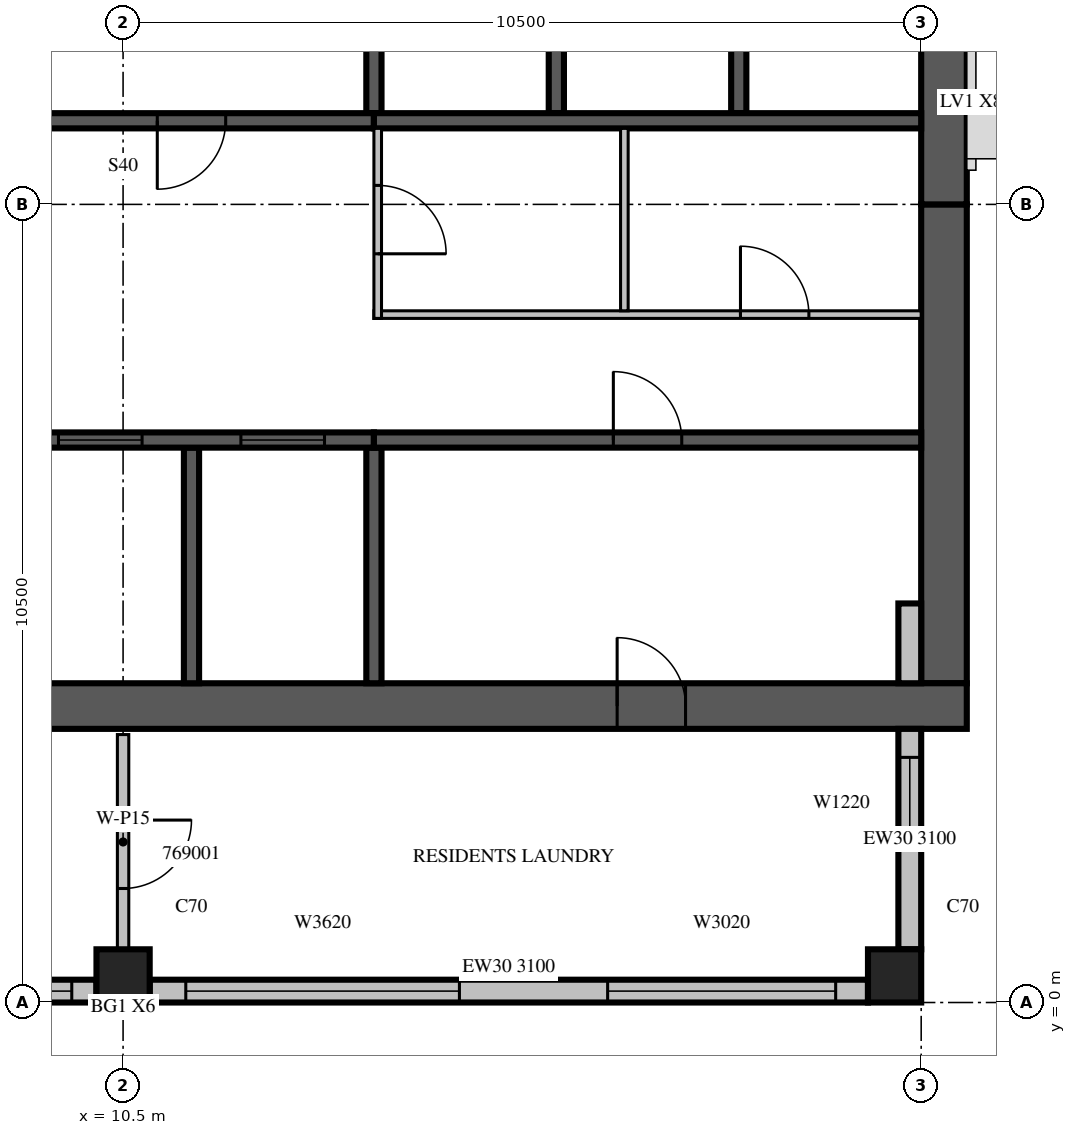
"""IFC4 building model, lengths in metres.
Left out: names, types, materials, properties, quantities, classifications, styles, units other than length and angle.
Written with IfcOpenShell. Run it as: python <this file> out.ifc"""

import sys

from ifc_helpers import new_model, si_unit, direction, frame, frame_2d, origin, origin_2d, place, context, subcontext, project, spatial, rectangle, extrude, source, transform, mapped, element, fill, save


model = new_model("IFC4")
c1 = context("Model", 3, precision=1e-05, world=origin(), true_north=direction((0.0, 1.0)))
c2 = subcontext(c1, "Body", "Model", "MODEL_VIEW")
j1 = project(units=[si_unit("LENGTHUNIT", "METRE"), si_unit("PLANEANGLEUNIT", "RADIAN")], contexts=[c1])
p1 = place(None, origin())
s1 = spatial("IfcSite", under=j1, at=p1, CompositionType="ELEMENT")
p2 = place(p1, origin())
s2 = spatial("IfcBuilding", under=s1, at=p2, CompositionType="ELEMENT")
p3 = place(p2, frame((0.0, 0.0, 302.0)))
s3 = spatial("IfcBuildingStorey", under=s2, at=p3, CompositionType="ELEMENT", Elevation=302.0)
m1 = source(origin(), c2, "Body", "SweptSolid", [
    extrude(rectangle(XDim=0.7, YDim=0.7, at=origin_2d()), origin(), (0.0, 0.0, 1.0), 3.5),
])
for number, where, z_axis, x_axis in (
    (1, (10.5, 0.35, 0.0), (0.0, 0.0, 1.0), (1.0, 0.0, 0.0)),
    (2, (20.65, 0.35, 0.0), (0.0, 0.0, 1.0), (1.0, 0.0, 0.0)),
):
    element("IfcColumn", number, at=place(p3, frame(where, z_axis=z_axis, x_axis=x_axis)), inside=s3, PredefinedType="COLUMN", context=c2, shape_type="MappedRepresentation", body=[
        mapped(m1, transform((0.0, 0.0, 0.0), scale=1.0)),
    ])
m2 = source(origin(), c2, "Body", "SweptSolid", [
    extrude(rectangle(XDim=6.3, YDim=0.6, at=frame_2d((3.15, 0.0))), origin(), (0.0, 0.0, 1.0), 3.5),
])
p4 = place(p3, frame((21.3, 4.2, 0.0), z_axis=(0.0, 0.0, 1.0), x_axis=(0.0, 1.0, 0.0)))
e3 = element("IfcWall", 3, at=p4, inside=s3, PredefinedType="SHEAR", context=c2, shape_type="MappedRepresentation", body=[
    mapped(m2, transform((0.0, 0.0, 0.0), scale=1.0)),
])
m3 = source(origin(), c2, "Body", "SweptSolid", [
    extrude(rectangle(XDim=17.4, YDim=0.6, at=frame_2d((8.7, 0.0))), origin(), (0.0, 0.0, 1.0), 3.5),
])
p5 = place(p3, frame((4.2, 3.9, 0.0), z_axis=(0.0, 0.0, 1.0), x_axis=(1.0, 0.0, 0.0)))
e4 = element("IfcWall", 4, at=p5, inside=s3, PredefinedType="SHEAR", context=c2, shape_type="MappedRepresentation", body=[
    mapped(m3, transform((0.0, 0.0, 0.0), scale=1.0)),
])
m4 = source(origin(), c2, "Body", "SweptSolid", [
    extrude(rectangle(XDim=0.9, YDim=2.1, at=frame_2d((0.45, 1.05))), frame((0.0, 0.31, 0.0), z_axis=(0.0, -1.0, 0.0), x_axis=(1.0, 0.0, 0.0)), (0.0, 0.0, 1.0), 0.62),
])
p6 = place(p5, frame((12.8, 0.0, 0.0)))
e5 = element("IfcOpeningElement", 5, at=p6, cuts=e4, PredefinedType="OPENING", context=c2, shape_type="MappedRepresentation", body=[
    mapped(m4, transform((0.0, 0.0, 0.0), scale=1.0)),
])
m5 = source(origin(), c2, "Body", "SweptSolid", [
    extrude(rectangle(XDim=10.5, YDim=0.6, at=frame_2d((5.25, 0.0))), origin(), (0.0, 0.0, 1.0), 3.5),
])
p7 = place(p3, frame((21.3, 10.5, 0.0), z_axis=(0.0, 0.0, 1.0), x_axis=(0.0, 1.0, 0.0)))
e6 = element("IfcWall", 6, at=p7, inside=s3, PredefinedType="SHEAR", context=c2, shape_type="MappedRepresentation", body=[
    mapped(m5, transform((0.0, 0.0, 0.0), scale=1.0)),
])
m6 = source(origin(), c2, "Body", "SweptSolid", [
    extrude(rectangle(XDim=1.2, YDim=2.4, at=frame_2d((0.6, 1.2))), frame((0.0, 0.31, 0.0), z_axis=(0.0, -1.0, 0.0), x_axis=(1.0, 0.0, 0.0)), (0.0, 0.0, 1.0), 0.62),
])
p8 = place(p7, frame((5.7, 0.0, 0.6)))
e7 = element("IfcOpeningElement", 7, at=p8, cuts=e6, PredefinedType="OPENING", context=c2, shape_type="MappedRepresentation", body=[
    mapped(m6, transform((0.0, 0.0, 0.0), scale=1.0)),
])
m7 = source(origin(), c2, "Body", "SweptSolid", [
    extrude(rectangle(XDim=5.95, YDim=0.3, at=frame_2d((2.975, 0.0))), origin(), (0.0, 0.0, 1.0), 3.1),
])
p9 = place(p3, frame((4.2, 0.15, 0.0), z_axis=(0.0, 0.0, 1.0), x_axis=(1.0, 0.0, 0.0)))
e8 = element("IfcWall", 8, at=p9, inside=s3, PredefinedType="STANDARD", context=c2, shape_type="MappedRepresentation", body=[
    mapped(m7, transform((0.0, 0.0, 0.0), scale=1.0)),
])
m8 = source(origin(), c2, "Body", "SweptSolid", [
    extrude(rectangle(XDim=1.8, YDim=2.0, at=frame_2d((0.9, 1.0))), frame((0.0, 0.16, 0.0), z_axis=(0.0, -1.0, 0.0), x_axis=(1.0, 0.0, 0.0)), (0.0, 0.0, 1.0), 0.32),
])
p10 = place(p9, frame((0.675, 0.0, 0.6)))
e9 = element("IfcOpeningElement", 9, at=p10, cuts=e8, PredefinedType="OPENING", context=c2, shape_type="MappedRepresentation", body=[
    mapped(m8, transform((0.0, 0.0, 0.0), scale=1.0)),
])
p11 = place(p9, frame((3.825, 0.0, 0.6)))
e10 = element("IfcOpeningElement", 10, at=p11, cuts=e8, PredefinedType="OPENING", context=c2, shape_type="MappedRepresentation", body=[
    mapped(m8, transform((0.0, 0.0, 0.0), scale=1.0)),
])
m9 = source(origin(), c2, "Body", "SweptSolid", [
    extrude(rectangle(XDim=9.45, YDim=0.3, at=frame_2d((4.725, 0.0))), origin(), (0.0, 0.0, 1.0), 3.1),
])
p12 = place(p3, frame((10.85, 0.15, 0.0), z_axis=(0.0, 0.0, 1.0), x_axis=(1.0, 0.0, 0.0)))
e11 = element("IfcWall", 11, at=p12, inside=s3, PredefinedType="STANDARD", context=c2, shape_type="MappedRepresentation", body=[
    mapped(m9, transform((0.0, 0.0, 0.0), scale=1.0)),
])
m10 = source(origin(), c2, "Body", "SweptSolid", [
    extrude(rectangle(XDim=3.6, YDim=2.0, at=frame_2d((1.8, 1.0))), frame((0.0, 0.16, 0.0), z_axis=(0.0, -1.0, 0.0), x_axis=(1.0, 0.0, 0.0)), (0.0, 0.0, 1.0), 0.32),
])
p13 = place(p12, frame((0.475, 0.0, 0.6)))
e12 = element("IfcOpeningElement", 12, at=p13, cuts=e11, PredefinedType="OPENING", context=c2, shape_type="MappedRepresentation", body=[
    mapped(m10, transform((0.0, 0.0, 0.0), scale=1.0)),
])
m11 = source(origin(), c2, "Body", "SweptSolid", [
    extrude(rectangle(XDim=3.0, YDim=2.0, at=frame_2d((1.5, 1.0))), frame((0.0, 0.16, 0.0), z_axis=(0.0, -1.0, 0.0), x_axis=(1.0, 0.0, 0.0)), (0.0, 0.0, 1.0), 0.32),
])
p14 = place(p12, frame((6.025, 0.0, 0.6)))
e13 = element("IfcOpeningElement", 13, at=p14, cuts=e11, PredefinedType="OPENING", context=c2, shape_type="MappedRepresentation", body=[
    mapped(m11, transform((0.0, 0.0, 0.0), scale=1.0)),
])
m12 = source(origin(), c2, "Body", "SweptSolid", [
    extrude(rectangle(XDim=2.9, YDim=0.3, at=frame_2d((1.45, 0.0))), origin(), (0.0, 0.0, 1.0), 3.1),
])
p15 = place(p3, frame((20.85, 0.7, 0.0), z_axis=(0.0, 0.0, 1.0), x_axis=(0.0, 1.0, 0.0)))
e14 = element("IfcWall", 14, at=p15, inside=s3, PredefinedType="STANDARD", context=c2, shape_type="MappedRepresentation", body=[
    mapped(m12, transform((0.0, 0.0, 0.0), scale=1.0)),
])
m13 = source(origin(), c2, "Body", "SweptSolid", [
    extrude(rectangle(XDim=1.2, YDim=2.0, at=frame_2d((0.6, 1.0))), frame((0.0, 0.16, 0.0), z_axis=(0.0, -1.0, 0.0), x_axis=(1.0, 0.0, 0.0)), (0.0, 0.0, 1.0), 0.32),
])
p16 = place(p15, frame((1.325, 0.0, 0.6)))
e15 = element("IfcOpeningElement", 15, at=p16, cuts=e14, PredefinedType="OPENING", context=c2, shape_type="MappedRepresentation", body=[
    mapped(m13, transform((0.0, 0.0, 0.0), scale=1.0)),
])
m14 = source(origin(), c2, "Body", "SweptSolid", [
    extrude(rectangle(XDim=1.05, YDim=0.3, at=frame_2d((0.525, 0.0))), origin(), (0.0, 0.0, 1.0), 3.1),
])
p17 = place(p3, frame((20.85, 4.2, 0.0), z_axis=(0.0, 0.0, 1.0), x_axis=(0.0, 1.0, 0.0)))
e16 = element("IfcWall", 16, at=p17, inside=s3, PredefinedType="STANDARD", context=c2, shape_type="MappedRepresentation", body=[
    mapped(m14, transform((0.0, 0.0, 0.0), scale=1.0)),
])
m15 = source(origin(), c2, "Body", "SweptSolid", [
    extrude(rectangle(XDim=3.1, YDim=0.2, at=frame_2d((1.55, 0.0))), origin(), (0.0, 0.0, 1.0), 3.5),
])
p18 = place(p3, frame((11.4, 4.2, 0.0), z_axis=(0.0, 0.0, 1.0), x_axis=(0.0, 1.0, 0.0)))
e17 = element("IfcWall", 17, at=p18, inside=s3, PredefinedType="SOLIDWALL", context=c2, shape_type="MappedRepresentation", body=[
    mapped(m15, transform((0.0, 0.0, 0.0), scale=1.0)),
])
m16 = source(origin(), c2, "Body", "SweptSolid", [
    extrude(rectangle(XDim=3.1, YDim=0.2, at=frame_2d((1.55, 0.0))), origin(), (0.0, 0.0, 1.0), 3.1),
])
p19 = place(p3, frame((13.8, 4.2, 0.0), z_axis=(0.0, 0.0, 1.0), x_axis=(0.0, 1.0, 0.0)))
e18 = element("IfcWall", 18, at=p19, inside=s3, PredefinedType="SOLIDWALL", context=c2, shape_type="MappedRepresentation", body=[
    mapped(m16, transform((0.0, 0.0, 0.0), scale=1.0)),
])
m17 = source(origin(), c2, "Body", "SweptSolid", [
    extrude(rectangle(XDim=3.0, YDim=0.2, at=frame_2d((1.5, 0.0))), origin(), (0.0, 0.0, 1.0), 3.1),
])
p20 = place(p3, frame((13.8, 11.7, 0.0), z_axis=(0.0, 0.0, 1.0), x_axis=(0.0, 1.0, 0.0)))
e19 = element("IfcWall", 19, at=p20, inside=s3, PredefinedType="SOLIDWALL", context=c2, shape_type="MappedRepresentation", body=[
    mapped(m17, transform((0.0, 0.0, 0.0), scale=1.0)),
])
m18 = source(origin(), c2, "Body", "SweptSolid", [
    extrude(rectangle(XDim=3.0, YDim=0.2, at=frame_2d((1.5, 0.0))), origin(), (0.0, 0.0, 1.0), 3.5),
])
for number, where, z_axis, x_axis in (
    (20, (16.2, 11.7, 0.0), (0.0, 0.0, 1.0), (0.0, 1.0, 0.0)),
    (21, (18.6, 11.7, 0.0), (0.0, 0.0, 1.0), (0.0, 1.0, 0.0)),
):
    element("IfcWall", number, at=place(p3, frame(where, z_axis=z_axis, x_axis=x_axis)), inside=s3, PredefinedType="SOLIDWALL", context=c2, shape_type="MappedRepresentation", body=[
        mapped(m18, transform((0.0, 0.0, 0.0), scale=1.0)),
    ])
m19 = source(origin(), c2, "Body", "SweptSolid", [
    extrude(rectangle(XDim=9.6, YDim=0.2, at=frame_2d((4.8, 0.0))), origin(), (0.0, 0.0, 1.0), 3.5),
])
p21 = place(p3, frame((4.2, 7.4, 0.0), z_axis=(0.0, 0.0, 1.0), x_axis=(1.0, 0.0, 0.0)))
e22 = element("IfcWall", 22, at=p21, inside=s3, PredefinedType="SOLIDWALL", context=c2, shape_type="MappedRepresentation", body=[
    mapped(m19, transform((0.0, 0.0, 0.0), scale=1.0)),
])
m20 = source(origin(), c2, "Body", "SweptSolid", [
    extrude(rectangle(XDim=1.1, YDim=2.1, at=frame_2d((0.55, 1.05))), frame((0.0, 0.11, 0.0), z_axis=(0.0, -1.0, 0.0), x_axis=(1.0, 0.0, 0.0)), (0.0, 0.0, 1.0), 0.22),
])
p22 = place(p21, frame((0.65, 0.0, 0.0)))
e23 = element("IfcOpeningElement", 23, at=p22, cuts=e22, PredefinedType="OPENING", context=c2, shape_type="MappedRepresentation", body=[
    mapped(m20, transform((0.0, 0.0, 0.0), scale=1.0)),
])
p23 = place(p21, frame((3.05, 0.0, 0.0)))
e24 = element("IfcOpeningElement", 24, at=p23, cuts=e22, PredefinedType="OPENING", context=c2, shape_type="MappedRepresentation", body=[
    mapped(m20, transform((0.0, 0.0, 0.0), scale=1.0)),
])
p24 = place(p21, frame((5.45, 0.0, 0.0)))
e25 = element("IfcOpeningElement", 25, at=p24, cuts=e22, PredefinedType="OPENING", context=c2, shape_type="MappedRepresentation", body=[
    mapped(m20, transform((0.0, 0.0, 0.0), scale=1.0)),
])
p25 = place(p21, frame((7.85, 0.0, 0.0)))
e26 = element("IfcOpeningElement", 26, at=p25, cuts=e22, PredefinedType="OPENING", context=c2, shape_type="MappedRepresentation", body=[
    mapped(m20, transform((0.0, 0.0, 0.0), scale=1.0)),
])
m21 = source(origin(), c2, "Body", "SweptSolid", [
    extrude(rectangle(XDim=7.2, YDim=0.2, at=frame_2d((3.6, 0.0))), origin(), (0.0, 0.0, 1.0), 3.1),
])
p26 = place(p3, frame((13.8, 7.4, 0.0), z_axis=(0.0, 0.0, 1.0), x_axis=(1.0, 0.0, 0.0)))
e27 = element("IfcWall", 27, at=p26, inside=s3, PredefinedType="SOLIDWALL", context=c2, shape_type="MappedRepresentation", body=[
    mapped(m21, transform((0.0, 0.0, 0.0), scale=1.0)),
])
m22 = source(origin(), c2, "Body", "SweptSolid", [
    extrude(rectangle(XDim=0.9, YDim=2.1, at=frame_2d((0.45, 1.05))), frame((0.0, 0.11, 0.0), z_axis=(0.0, -1.0, 0.0), x_axis=(1.0, 0.0, 0.0)), (0.0, 0.0, 1.0), 0.22),
])
p27 = place(p26, frame((3.15, 0.0, 0.0)))
e28 = element("IfcOpeningElement", 28, at=p27, cuts=e27, PredefinedType="OPENING", context=c2, shape_type="MappedRepresentation", body=[
    mapped(m22, transform((0.0, 0.0, 0.0), scale=1.0)),
])
m23 = source(origin(), c2, "Body", "SweptSolid", [
    extrude(rectangle(XDim=4.8, YDim=0.2, at=frame_2d((2.4, 0.0))), origin(), (0.0, 0.0, 1.0), 3.1),
])
p28 = place(p3, frame((9.0, 11.6, 0.0), z_axis=(0.0, 0.0, 1.0), x_axis=(1.0, 0.0, 0.0)))
e29 = element("IfcWall", 29, at=p28, inside=s3, PredefinedType="SOLIDWALL", context=c2, shape_type="MappedRepresentation", body=[
    mapped(m23, transform((0.0, 0.0, 0.0), scale=1.0)),
])
p29 = place(p28, frame((1.95, 0.0, 0.0)))
e30 = element("IfcOpeningElement", 30, at=p29, cuts=e29, PredefinedType="OPENING", context=c2, shape_type="MappedRepresentation", body=[
    mapped(m22, transform((0.0, 0.0, 0.0), scale=1.0)),
])
m24 = source(origin(), c2, "Body", "SweptSolid", [
    extrude(rectangle(XDim=7.2, YDim=0.2, at=frame_2d((3.6, 0.0))), origin(), (0.0, 0.0, 1.0), 3.5),
])
p30 = place(p3, frame((13.8, 11.6, 0.0), z_axis=(0.0, 0.0, 1.0), x_axis=(1.0, 0.0, 0.0)))
e31 = element("IfcWall", 31, at=p30, inside=s3, PredefinedType="SOLIDWALL", context=c2, shape_type="MappedRepresentation", body=[
    mapped(m24, transform((0.0, 0.0, 0.0), scale=1.0)),
])
m25 = source(origin(), c2, "Body", "SweptSolid", [
    extrude(rectangle(XDim=7.2, YDim=0.1, at=frame_2d((3.6, 0.0))), origin(), (0.0, 0.0, 1.0), 3.1),
])
p31 = place(p3, frame((13.8, 9.05, 0.0), z_axis=(0.0, 0.0, 1.0), x_axis=(1.0, 0.0, 0.0)))
e32 = element("IfcWall", 32, at=p31, inside=s3, PredefinedType="PARTITIONING", context=c2, shape_type="MappedRepresentation", body=[
    mapped(m25, transform((0.0, 0.0, 0.0), scale=1.0)),
])
m26 = source(origin(), c2, "Body", "SweptSolid", [
    extrude(rectangle(XDim=0.9, YDim=2.1, at=frame_2d((0.45, 1.05))), frame((0.0, 0.06, 0.0), z_axis=(0.0, -1.0, 0.0), x_axis=(1.0, 0.0, 0.0)), (0.0, 0.0, 1.0), 0.12),
])
p32 = place(p31, frame((4.822, 0.0, 0.0)))
e33 = element("IfcOpeningElement", 33, at=p32, cuts=e32, PredefinedType="OPENING", context=c2, shape_type="MappedRepresentation", body=[
    mapped(m26, transform((0.0, 0.0, 0.0), scale=1.0)),
])
m27 = source(origin(), c2, "Body", "SweptSolid", [
    extrude(rectangle(XDim=2.5, YDim=0.1, at=frame_2d((1.25, 0.0))), origin(), (0.0, 0.0, 1.0), 3.1),
])
p33 = place(p3, frame((13.85, 9.0, 0.0), z_axis=(0.0, 0.0, 1.0), x_axis=(0.0, 1.0, 0.0)))
e34 = element("IfcWall", 34, at=p33, inside=s3, PredefinedType="PARTITIONING", context=c2, shape_type="MappedRepresentation", body=[
    mapped(m27, transform((0.0, 0.0, 0.0), scale=1.0)),
])
p34 = place(p33, frame((0.85, 0.0, 0.0)))
e35 = element("IfcOpeningElement", 35, at=p34, cuts=e34, PredefinedType="OPENING", context=c2, shape_type="MappedRepresentation", body=[
    mapped(m26, transform((0.0, 0.0, 0.0), scale=1.0)),
])
m28 = source(origin(), c2, "Body", "SweptSolid", [
    extrude(rectangle(XDim=2.4, YDim=0.1, at=frame_2d((1.2, 0.0))), origin(), (0.0, 0.0, 1.0), 3.1),
])
p35 = place(p3, frame((17.095, 9.1, 0.0), z_axis=(0.0, 0.0, 1.0), x_axis=(0.0, 1.0, 0.0)))
e36 = element("IfcWall", 36, at=p35, inside=s3, PredefinedType="PARTITIONING", context=c2, shape_type="MappedRepresentation", body=[
    mapped(m28, transform((0.0, 0.0, 0.0), scale=1.0)),
])
m29 = source(origin(), c2, "Body", "SweptSolid", [
    extrude(rectangle(XDim=2.826, YDim=0.15, at=frame_2d((1.413, 0.0))), origin(), (0.0, 0.0, 1.0), 3.1),
])
p36 = place(p3, frame((10.5, 3.525, 0.0), z_axis=(0.0, 0.0, 1.0), x_axis=(0.0, -1.0, 0.0)))
e37 = element("IfcWall", 37, at=p36, inside=s3, PredefinedType="PARTITIONING", context=c2, shape_type="MappedRepresentation", body=[
    mapped(m29, transform((0.0, 0.0, 0.0), scale=1.0)),
])
m30 = source(origin(), c2, "Body", "SweptSolid", [
    extrude(rectangle(XDim=0.9, YDim=2.1, at=frame_2d((0.45, 1.05))), frame((0.0, 0.085, 0.0), z_axis=(0.0, -1.0, 0.0), x_axis=(1.0, 0.0, 0.0)), (0.0, 0.0, 1.0), 0.17),
])
p37 = place(p36, frame((1.125, 0.0, 0.0)))
e38 = element("IfcOpeningElement", 38, at=p37, cuts=e37, PredefinedType="OPENING", context=c2, shape_type="MappedRepresentation", body=[
    mapped(m30, transform((0.0, 0.0, 0.0), scale=1.0)),
])
m31 = source(origin(), c2, "Body", "SweptSolid", [
    extrude(rectangle(XDim=1.8, YDim=2.0, at=frame_2d((0.9, 1.0))), frame((0.0, 0.03, 0.0), z_axis=(0.0, -1.0, 0.0), x_axis=(1.0, 0.0, 0.0)), (0.0, 0.0, 1.0), 0.06),
])
p38 = place(p11, origin())
e39 = element("IfcWindow", 39, at=p38, inside=s3, PartitioningType="SINGLE_PANEL", PredefinedType="WINDOW", context=c2, shape_type="MappedRepresentation", body=[
    mapped(m31, transform((0.0, 0.0, 0.0), scale=1.0)),
])
fill(e10, e39)
m32 = source(origin(), c2, "Body", "SweptSolid", [
    extrude(rectangle(XDim=3.6, YDim=2.0, at=frame_2d((1.8, 1.0))), frame((0.0, 0.03, 0.0), z_axis=(0.0, -1.0, 0.0), x_axis=(1.0, 0.0, 0.0)), (0.0, 0.0, 1.0), 0.06),
])
p39 = place(p13, origin())
e40 = element("IfcWindow", 40, at=p39, inside=s3, PartitioningType="SINGLE_PANEL", PredefinedType="WINDOW", context=c2, shape_type="MappedRepresentation", body=[
    mapped(m32, transform((0.0, 0.0, 0.0), scale=1.0)),
])
fill(e12, e40)
m33 = source(origin(), c2, "Body", "SweptSolid", [
    extrude(rectangle(XDim=3.0, YDim=2.0, at=frame_2d((1.5, 1.0))), frame((0.0, 0.03, 0.0), z_axis=(0.0, -1.0, 0.0), x_axis=(1.0, 0.0, 0.0)), (0.0, 0.0, 1.0), 0.06),
])
p40 = place(p14, origin())
e41 = element("IfcWindow", 41, at=p40, inside=s3, PartitioningType="SINGLE_PANEL", PredefinedType="WINDOW", context=c2, shape_type="MappedRepresentation", body=[
    mapped(m33, transform((0.0, 0.0, 0.0), scale=1.0)),
])
fill(e13, e41)
m34 = source(origin(), c2, "Body", "SweptSolid", [
    extrude(rectangle(XDim=1.2, YDim=2.0, at=frame_2d((0.6, 1.0))), frame((0.0, 0.03, 0.0), z_axis=(0.0, -1.0, 0.0), x_axis=(1.0, 0.0, 0.0)), (0.0, 0.0, 1.0), 0.06),
])
p41 = place(p16, origin())
e42 = element("IfcWindow", 42, at=p41, inside=s3, PartitioningType="SINGLE_PANEL", PredefinedType="WINDOW", context=c2, shape_type="MappedRepresentation", body=[
    mapped(m34, transform((0.0, 0.0, 0.0), scale=1.0)),
])
fill(e15, e42)
m35 = source(origin(), c2, "Body", "SweptSolid", [
    extrude(rectangle(XDim=1.1, YDim=2.1, at=frame_2d((0.55, 1.05))), frame((0.0, 0.025, 0.0), z_axis=(0.0, -1.0, 0.0), x_axis=(1.0, 0.0, 0.0)), (0.0, 0.0, 1.0), 0.05),
])
p42 = place(p24, origin())
e43 = element("IfcDoor", 43, at=p42, inside=s3, OperationType="SLIDING_TO_LEFT", PredefinedType="DOOR", context=c2, shape_type="MappedRepresentation", body=[
    mapped(m35, transform((0.0, 0.0, 0.0), scale=1.0)),
])
fill(e25, e43)
p43 = place(p25, origin())
e44 = element("IfcDoor", 44, at=p43, inside=s3, OperationType="SLIDING_TO_LEFT", PredefinedType="DOOR", context=c2, shape_type="MappedRepresentation", body=[
    mapped(m35, transform((0.0, 0.0, 0.0), scale=1.0)),
])
fill(e26, e44)
m36 = source(origin(), c2, "Body", "SweptSolid", [
    extrude(rectangle(XDim=0.9, YDim=2.1, at=frame_2d((0.45, 1.05))), frame((0.0, 0.025, 0.0), z_axis=(0.0, -1.0, 0.0), x_axis=(1.0, 0.0, 0.0)), (0.0, 0.0, 1.0), 0.05),
])
p44 = place(p27, origin())
e45 = element("IfcDoor", 45, at=p44, inside=s3, OperationType="SINGLE_SWING_LEFT", PredefinedType="DOOR", context=c2, shape_type="MappedRepresentation", body=[
    mapped(m36, transform((0.0, 0.0, 0.0), scale=1.0)),
])
fill(e28, e45)
p45 = place(p29, origin())
e46 = element("IfcDoor", 46, at=p45, inside=s3, OperationType="SINGLE_SWING_RIGHT", PredefinedType="DOOR", context=c2, shape_type="MappedRepresentation", body=[
    mapped(m36, transform((0.0, 0.0, 0.0), scale=1.0)),
])
fill(e30, e46)
p46 = place(p32, origin())
e47 = element("IfcDoor", 47, at=p46, inside=s3, OperationType="SINGLE_SWING_LEFT", PredefinedType="DOOR", context=c2, shape_type="MappedRepresentation", body=[
    mapped(m36, transform((0.0, 0.0, 0.0), scale=1.0)),
])
fill(e33, e47)
p47 = place(p34, origin())
e48 = element("IfcDoor", 48, at=p47, inside=s3, OperationType="SINGLE_SWING_RIGHT", PredefinedType="DOOR", context=c2, shape_type="MappedRepresentation", body=[
    mapped(m36, transform((0.0, 0.0, 0.0), scale=1.0)),
])
fill(e35, e48)
p48 = place(p6, origin())
e49 = element("IfcDoor", 49, at=p48, inside=s3, OperationType="SINGLE_SWING_LEFT", PredefinedType="DOOR", context=c2, shape_type="MappedRepresentation", body=[
    mapped(m36, transform((0.0, 0.0, 0.0), scale=1.0)),
])
fill(e5, e49)
p49 = place(p37, origin())
e50 = element("IfcDoor", 50, at=p49, inside=s3, OperationType="SINGLE_SWING_LEFT", PredefinedType="DOOR", context=c2, shape_type="MappedRepresentation", body=[
    mapped(m36, transform((0.0, 0.0, 0.0), scale=1.0)),
])
fill(e38, e50)
save(model, sys.argv[1])
